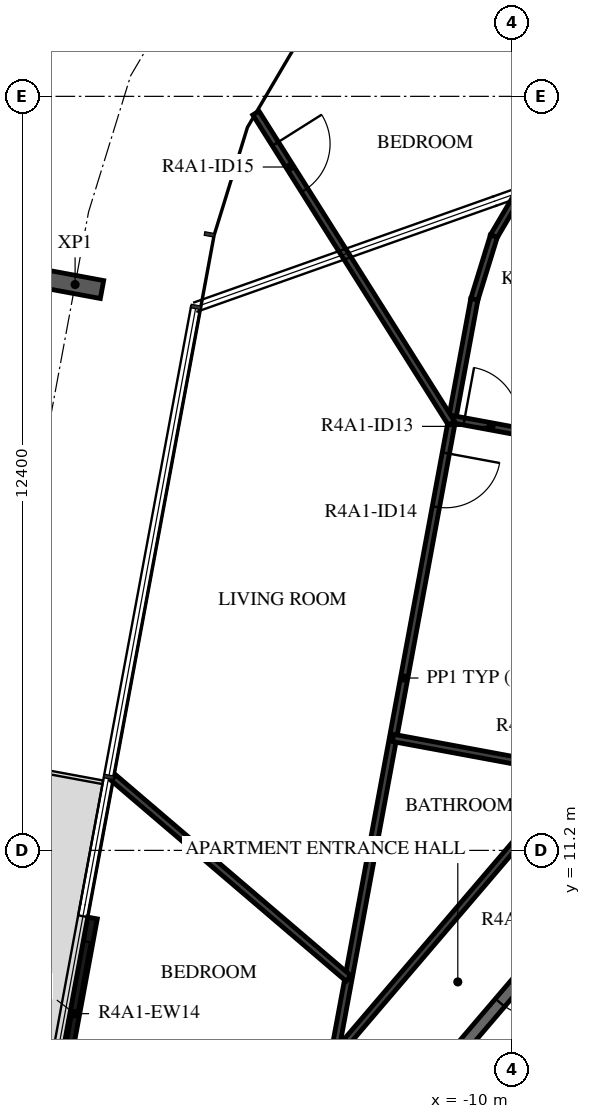
"""IFC4 building model, lengths in metres.
Left out: names, types, materials, properties, quantities, classifications, styles, units other than length and angle.
Written with IfcOpenShell. Run it as: python <this file> out.ifc"""

import sys

from ifc_helpers import new_model, si_unit, direction, frame, frame_2d, origin, origin_2d, place, context, subcontext, project, spatial, rectangle, i_section, extrude, element, fill, save


model = new_model("IFC4")
c1 = context("Model", 3, precision=1e-05, world=origin(), true_north=direction((0.0, 1.0)))
c2 = subcontext(c1, "Body", "Model", "MODEL_VIEW")
j1 = project(units=[si_unit("LENGTHUNIT", "METRE"), si_unit("PLANEANGLEUNIT", "RADIAN")], contexts=[c1])
p1 = place(None, origin())
s1 = spatial("IfcSite", under=j1, at=p1, CompositionType="ELEMENT")
p2 = place(p1, origin())
s2 = spatial("IfcBuilding", under=s1, at=p2, CompositionType="ELEMENT")
p3 = place(p2, frame((0.0, 0.0, 155.2)))
s3 = spatial("IfcBuildingStorey", under=s2, at=p3, CompositionType="ELEMENT", Elevation=155.2)
p4 = place(p3, frame((-17.184, 20.505, -0.38), z_axis=(0.0, 0.0, 1.0), x_axis=(0.182235967681, 0.983254825609, 0.0)))
e1 = element("IfcColumn", 1, at=p4, inside=s3, PredefinedType="COLUMN", context=c2, shape_type="SweptSolid", body=[
    extrude(i_section(OverallWidth=0.3, OverallDepth=0.9, WebThickness=0.019, FlangeThickness=0.035, FilletRadius=0.03, at=origin_2d()), origin(), (0.0, 0.0, 1.0), 3.5),
])
p5 = place(p3, frame((-16.897, 10.088, 0.0), z_axis=(0.0, 0.0, 1.0), x_axis=(-0.18226136951, -0.983250117307, 0.0)))
e2 = element("IfcWall", 2, at=p5, inside=s3, PredefinedType="STANDARD", context=c2, shape_type="SweptSolid", body=[
    extrude(rectangle(XDim=3.2, YDim=0.16, at=frame_2d((1.6, 0.0))), origin(), (0.0, 0.0, 1.0), 3.12),
])
p6 = place(p5, frame((0.4, 0.0, 0.0)))
e3 = element("IfcOpeningElement", 3, at=p6, cuts=e2, PredefinedType="OPENING", context=c2, shape_type="SweptSolid", body=[
    extrude(rectangle(XDim=2.4, YDim=2.4, at=frame_2d((1.2, 1.2))), frame((0.0, 0.09, 0.0), z_axis=(0.0, -1.0, 0.0), x_axis=(1.0, 0.0, 0.0)), (0.0, 0.0, 1.0), 0.18),
])
p7 = place(p3, frame((-7.858, 11.433, 0.0), z_axis=(0.0, 0.0, 1.0), x_axis=(-0.649440801937, -0.760412154545, 0.0)))
e4 = element("IfcWall", 4, at=p7, inside=s3, PredefinedType="STANDARD", context=c2, shape_type="SweptSolid", body=[
    extrude(rectangle(XDim=7.181, YDim=0.2, at=frame_2d((3.59, 0.0))), origin(), (0.0, 0.0, 1.0), 3.12),
])
p8 = place(p7, frame((2.6, 0.0, 0.0)))
e5 = element("IfcOpeningElement", 5, at=p8, cuts=e4, PredefinedType="OPENING", context=c2, shape_type="SweptSolid", body=[
    extrude(rectangle(XDim=1.0, YDim=2.1, at=frame_2d((0.5, 1.05))), frame((0.0, 0.11, 0.0), z_axis=(0.0, -1.0, 0.0), x_axis=(1.0, 0.0, 0.0)), (0.0, 0.0, 1.0), 0.22),
])
p9 = place(p3, frame((-8.929, 12.488, 0.0), z_axis=(0.0, 0.0, 1.0), x_axis=(-0.64944646045, -0.760407321775, 0.0)))
e6 = element("IfcWall", 6, at=p9, inside=s3, PredefinedType="PARTITIONING", context=c2, shape_type="SweptSolid", body=[
    extrude(rectangle(XDim=7.69, YDim=0.12, at=frame_2d((3.845, 0.0))), origin(), (0.0, 0.0, 1.0), 3.12),
])
p10 = place(p9, frame((0.4, 0.0, 0.0)))
e7 = element("IfcOpeningElement", 7, at=p10, cuts=e6, PredefinedType="OPENING", context=c2, shape_type="SweptSolid", body=[
    extrude(rectangle(XDim=0.8, YDim=2.1, at=frame_2d((0.4, 1.05))), frame((0.0, 0.07, 0.0), z_axis=(0.0, -1.0, 0.0), x_axis=(1.0, 0.0, 0.0)), (0.0, 0.0, 1.0), 0.14),
])
p11 = place(p9, frame((6.356, 0.0, 0.0)))
e8 = element("IfcOpeningElement", 8, at=p11, cuts=e6, PredefinedType="OPENING", context=c2, shape_type="SweptSolid", body=[
    extrude(rectangle(XDim=0.9, YDim=2.1, at=frame_2d((0.45, 1.05))), frame((0.0, 0.07, 0.0), z_axis=(0.0, -1.0, 0.0), x_axis=(1.0, 0.0, 0.0)), (0.0, 0.0, 1.0), 0.14),
])
p12 = place(p3, frame((-9.877, 22.014, 0.0), z_axis=(0.0, 0.0, 1.0), x_axis=(-0.507766478099, -0.861494749676, 0.0)))
e9 = element("IfcWall", 9, at=p12, inside=s3, PredefinedType="PARTITIONING", context=c2, shape_type="SweptSolid", body=[
    extrude(rectangle(XDim=0.829, YDim=0.12, at=frame_2d((0.415, 0.0))), origin(), (0.0, 0.0, 1.0), 3.12),
])
p13 = place(p3, frame((-10.298, 21.3, 0.0), z_axis=(0.0, 0.0, 1.0), x_axis=(-0.295127342945, -0.955457927617, 0.0)))
e10 = element("IfcWall", 10, at=p13, inside=s3, PredefinedType="PARTITIONING", context=c2, shape_type="SweptSolid", body=[
    extrude(rectangle(XDim=1.087, YDim=0.12, at=frame_2d((0.543, 0.0))), origin(), (0.0, 0.0, 1.0), 3.12),
])
p14 = place(p3, frame((-10.618, 20.262, 0.0), z_axis=(0.0, 0.0, 1.0), x_axis=(-0.182222468274, -0.983257327487, 0.0)))
e11 = element("IfcWall", 11, at=p14, inside=s3, PredefinedType="PARTITIONING", context=c2, shape_type="SweptSolid", body=[
    extrude(rectangle(XDim=12.667, YDim=0.12, at=frame_2d((6.333, 0.0))), origin(), (0.0, 0.0, 1.0), 3.12),
])
p15 = place(p14, frame((2.57, 0.0, 0.0)))
e12 = element("IfcOpeningElement", 12, at=p15, cuts=e11, PredefinedType="OPENING", context=c2, shape_type="SweptSolid", body=[
    extrude(rectangle(XDim=0.9, YDim=2.1, at=frame_2d((0.45, 1.05))), frame((0.0, 0.07, 0.0), z_axis=(0.0, -1.0, 0.0), x_axis=(1.0, 0.0, 0.0)), (0.0, 0.0, 1.0), 0.14),
])
p16 = place(p3, frame((-10.984, 18.291, 0.0), z_axis=(0.0, 0.0, 1.0), x_axis=(0.98324782266, -0.182273748068, 0.0)))
e13 = element("IfcWall", 13, at=p16, inside=s3, PredefinedType="PARTITIONING", context=c2, shape_type="SweptSolid", body=[
    extrude(rectangle(XDim=4.881, YDim=0.12, at=frame_2d((2.44, 0.0))), origin(), (0.0, 0.0, 1.0), 3.12),
])
p17 = place(p16, frame((0.2, 0.0, 0.0)))
e14 = element("IfcOpeningElement", 14, at=p17, cuts=e13, PredefinedType="OPENING", context=c2, shape_type="SweptSolid", body=[
    extrude(rectangle(XDim=0.9, YDim=2.1, at=frame_2d((0.45, 1.05))), frame((0.0, 0.07, 0.0), z_axis=(0.0, -1.0, 0.0), x_axis=(1.0, 0.0, 0.0)), (0.0, 0.0, 1.0), 0.14),
])
p18 = place(p3, frame((-14.211, 23.326, 0.0), z_axis=(0.0, 0.0, 1.0), x_axis=(0.533278244906, -0.845939899467, 0.0)))
e15 = element("IfcWall", 15, at=p18, inside=s3, PredefinedType="PARTITIONING", context=c2, shape_type="SweptSolid", body=[
    extrude(rectangle(XDim=6.029, YDim=0.12, at=frame_2d((3.014, 0.0))), origin(), (0.0, 0.0, 1.0), 3.12),
])
p19 = place(p18, frame((0.6, 0.0, 0.0)))
e16 = element("IfcOpeningElement", 16, at=p19, cuts=e15, PredefinedType="OPENING", context=c2, shape_type="SweptSolid", body=[
    extrude(rectangle(XDim=0.9, YDim=2.1, at=frame_2d((0.45, 1.05))), frame((0.0, 0.07, 0.0), z_axis=(0.0, -1.0, 0.0), x_axis=(1.0, 0.0, 0.0)), (0.0, 0.0, 1.0), 0.14),
])
p20 = place(p3, frame((-11.955, 13.049, 0.0), z_axis=(0.0, 0.0, 1.0), x_axis=(0.983247271586, -0.182276720725, 0.0)))
e17 = element("IfcWall", 17, at=p20, inside=s3, PredefinedType="PARTITIONING", context=c2, shape_type="SweptSolid", body=[
    extrude(rectangle(XDim=3.078, YDim=0.12, at=frame_2d((1.539, 0.0))), origin(), (0.0, 0.0, 1.0), 3.12),
])
p21 = place(p3, frame((-16.552, 12.394, 0.0), z_axis=(0.0, 0.0, 1.0), x_axis=(0.760425586578, -0.649425074414, 0.0)))
e18 = element("IfcWall", 18, at=p21, inside=s3, PredefinedType="PARTITIONING", context=c2, shape_type="SweptSolid", body=[
    extrude(rectangle(XDim=5.081, YDim=0.12, at=frame_2d((2.541, 0.0))), origin(), (0.0, 0.0, 1.0), 3.12),
])
p22 = place(p6, origin())
e19 = element("IfcDoor", 19, at=p22, inside=s3, OperationType="DOUBLE_DOOR_SLIDING", PredefinedType="DOOR", context=c2, shape_type="SweptSolid", body=[
    extrude(rectangle(XDim=2.4, YDim=2.4, at=frame_2d((1.2, 1.2))), frame((0.0, 0.025, 0.0), z_axis=(0.0, -1.0, 0.0), x_axis=(1.0, 0.0, 0.0)), (0.0, 0.0, 1.0), 0.05),
])
fill(e3, e19)
p23 = place(p8, origin())
e20 = element("IfcDoor", 20, at=p23, inside=s3, OperationType="SINGLE_SWING_LEFT", PredefinedType="DOOR", context=c2, shape_type="SweptSolid", body=[
    extrude(rectangle(XDim=1.0, YDim=2.1, at=frame_2d((0.5, 1.05))), frame((0.0, 0.025, 0.0), z_axis=(0.0, -1.0, 0.0), x_axis=(1.0, 0.0, 0.0)), (0.0, 0.0, 1.0), 0.05),
])
fill(e5, e20)
p24 = place(p17, origin())
e21 = element("IfcDoor", 21, at=p24, inside=s3, OperationType="SINGLE_SWING_LEFT", PredefinedType="DOOR", context=c2, shape_type="SweptSolid", body=[
    extrude(rectangle(XDim=0.9, YDim=2.1, at=frame_2d((0.45, 1.05))), frame((0.0, 0.025, 0.0), z_axis=(0.0, -1.0, 0.0), x_axis=(1.0, 0.0, 0.0)), (0.0, 0.0, 1.0), 0.05),
])
fill(e14, e21)
p25 = place(p15, origin())
e22 = element("IfcDoor", 22, at=p25, inside=s3, OperationType="SINGLE_SWING_LEFT", PredefinedType="DOOR", context=c2, shape_type="SweptSolid", body=[
    extrude(rectangle(XDim=0.9, YDim=2.1, at=frame_2d((0.45, 1.05))), frame((0.0, 0.025, 0.0), z_axis=(0.0, -1.0, 0.0), x_axis=(1.0, 0.0, 0.0)), (0.0, 0.0, 1.0), 0.05),
])
fill(e12, e22)
p26 = place(p19, origin())
e23 = element("IfcDoor", 23, at=p26, inside=s3, OperationType="SINGLE_SWING_LEFT", PredefinedType="DOOR", context=c2, shape_type="SweptSolid", body=[
    extrude(rectangle(XDim=0.9, YDim=2.1, at=frame_2d((0.45, 1.05))), frame((0.0, 0.025, 0.0), z_axis=(0.0, -1.0, 0.0), x_axis=(1.0, 0.0, 0.0)), (0.0, 0.0, 1.0), 0.05),
])
fill(e16, e23)
save(model, sys.argv[1])
